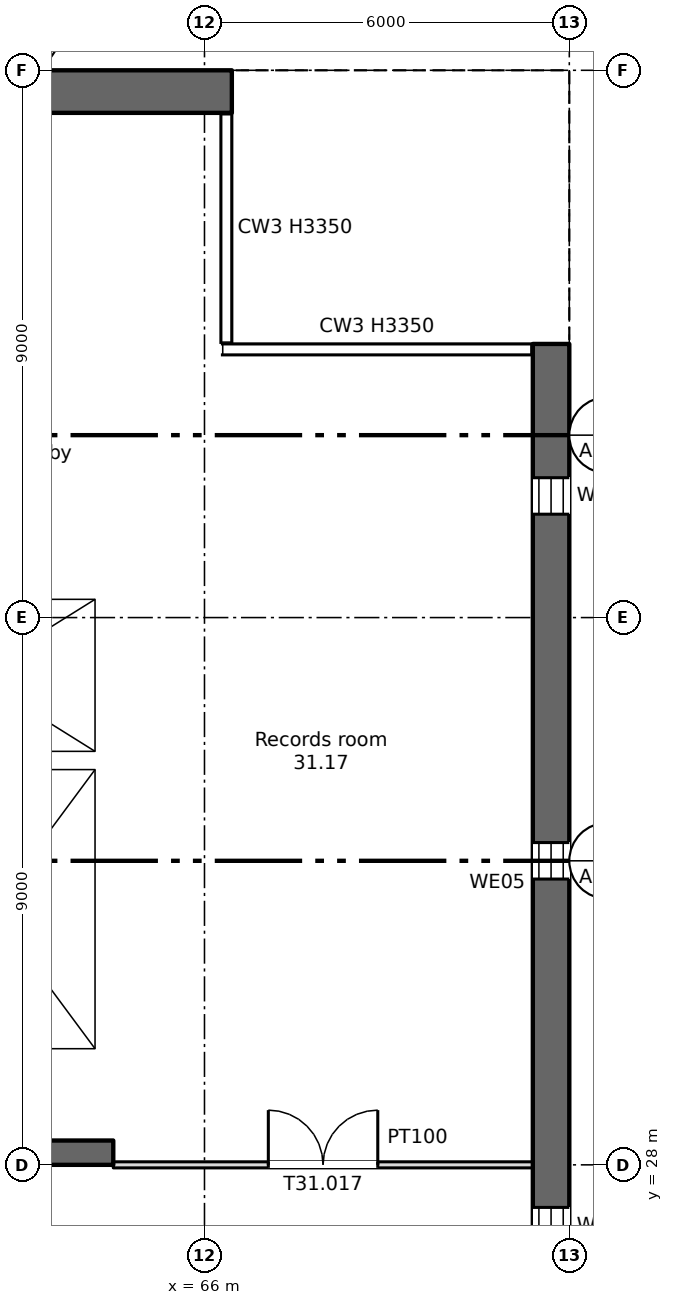
"""IFC4 building model, lengths in metres.
Left out: names, types, materials, properties, quantities, classifications, styles, units other than length and angle.
Written with IfcOpenShell. Run it as: python <this file> out.ifc"""

import sys

from ifc_helpers import new_model, si_unit, direction, frame, frame_2d, origin, place, context, subcontext, project, spatial, rectangle, extrude, element, fill, save


model = new_model("IFC4")
c1 = context("Model", 3, precision=1e-05, world=origin(), true_north=direction((0.0, 1.0)))
c2 = subcontext(c1, "Body", "Model", "MODEL_VIEW")
j1 = project(units=[si_unit("LENGTHUNIT", "METRE"), si_unit("PLANEANGLEUNIT", "RADIAN")], contexts=[c1])
p1 = place(None, origin())
s1 = spatial("IfcSite", under=j1, at=p1, CompositionType="ELEMENT")
p2 = place(p1, origin())
s2 = spatial("IfcBuilding", under=s1, at=p2, CompositionType="ELEMENT")
p3 = place(p2, frame((0.0, 0.0, 215.5)))
s3 = spatial("IfcBuildingStorey", under=s2, at=p3, CompositionType="ELEMENT", Elevation=215.5)
p4 = place(p3, frame((71.7, 7.5, 0.0), z_axis=(0.0, 0.0, 1.0), x_axis=(0.0, 1.0, 0.0)))
e1 = element("IfcWall", 1, at=p4, inside=s3, PredefinedType="SHEAR", context=c2, shape_type="SweptSolid", body=[
    extrude(rectangle(XDim=34.0, YDim=0.6, at=frame_2d((17.0, 0.0))), origin(), (0.0, 0.0, 1.0), 3.35),
])
p5 = place(p4, frame((1.2, 0.0, 0.6)))
e2 = element("IfcOpeningElement", 2, at=p5, cuts=e1, PredefinedType="OPENING", context=c2, shape_type="SweptSolid", body=[
    extrude(rectangle(XDim=0.6, YDim=2.4, at=frame_2d((0.3, 1.2))), frame((0.0, 0.31, 0.0), z_axis=(0.0, -1.0, 0.0), x_axis=(1.0, 0.0, 0.0)), (0.0, 0.0, 1.0), 0.62),
])
p6 = place(p4, frame((7.2, 0.0, 0.6)))
e3 = element("IfcOpeningElement", 3, at=p6, cuts=e1, PredefinedType="OPENING", context=c2, shape_type="SweptSolid", body=[
    extrude(rectangle(XDim=0.6, YDim=2.4, at=frame_2d((0.3, 1.2))), frame((0.0, 0.31, 0.0), z_axis=(0.0, -1.0, 0.0), x_axis=(1.0, 0.0, 0.0)), (0.0, 0.0, 1.0), 0.62),
])
p7 = place(p4, frame((13.2, 0.0, 0.6)))
e4 = element("IfcOpeningElement", 4, at=p7, cuts=e1, PredefinedType="OPENING", context=c2, shape_type="SweptSolid", body=[
    extrude(rectangle(XDim=0.6, YDim=2.4, at=frame_2d((0.3, 1.2))), frame((0.0, 0.31, 0.0), z_axis=(0.0, -1.0, 0.0), x_axis=(1.0, 0.0, 0.0)), (0.0, 0.0, 1.0), 0.62),
])
p8 = place(p4, frame((19.2, 0.0, 0.6)))
e5 = element("IfcOpeningElement", 5, at=p8, cuts=e1, PredefinedType="OPENING", context=c2, shape_type="SweptSolid", body=[
    extrude(rectangle(XDim=0.6, YDim=2.4, at=frame_2d((0.3, 1.2))), frame((0.0, 0.31, 0.0), z_axis=(0.0, -1.0, 0.0), x_axis=(1.0, 0.0, 0.0)), (0.0, 0.0, 1.0), 0.62),
])
p9 = place(p4, frame((25.2, 0.0, 0.6)))
e6 = element("IfcOpeningElement", 6, at=p9, cuts=e1, PredefinedType="OPENING", context=c2, shape_type="SweptSolid", body=[
    extrude(rectangle(XDim=0.6, YDim=2.4, at=frame_2d((0.3, 1.2))), frame((0.0, 0.31, 0.0), z_axis=(0.0, -1.0, 0.0), x_axis=(1.0, 0.0, 0.0)), (0.0, 0.0, 1.0), 0.62),
])
p10 = place(p4, frame((31.2, 0.0, 0.6)))
e7 = element("IfcOpeningElement", 7, at=p10, cuts=e1, PredefinedType="OPENING", context=c2, shape_type="SweptSolid", body=[
    extrude(rectangle(XDim=0.6, YDim=2.4, at=frame_2d((0.3, 1.2))), frame((0.0, 0.31, 0.0), z_axis=(0.0, -1.0, 0.0), x_axis=(1.0, 0.0, 0.0)), (0.0, 0.0, 1.0), 0.62),
])
p11 = place(p3, frame((11.55, 45.65, 0.0), z_axis=(0.0, 0.0, 1.0), x_axis=(1.0, 0.0, 0.0)))
e8 = element("IfcWall", 8, at=p11, inside=s3, PredefinedType="SHEAR", context=c2, shape_type="SweptSolid", body=[
    extrude(rectangle(XDim=54.9, YDim=0.7, at=frame_2d((27.45, 0.0))), origin(), (0.0, 0.0, 1.0), 3.35),
])
p12 = place(p11, frame((1.2, 0.0, 0.6)))
e9 = element("IfcOpeningElement", 9, at=p12, cuts=e8, PredefinedType="OPENING", context=c2, shape_type="SweptSolid", body=[
    extrude(rectangle(XDim=0.6, YDim=2.4, at=frame_2d((0.3, 1.2))), frame((0.0, 0.36, 0.0), z_axis=(0.0, -1.0, 0.0), x_axis=(1.0, 0.0, 0.0)), (0.0, 0.0, 1.0), 0.72),
])
p13 = place(p3, frame((6.6, 28.2, 0.0), z_axis=(0.0, 0.0, 1.0), x_axis=(1.0, 0.0, 0.0)))
e10 = element("IfcWall", 10, at=p13, inside=s3, PredefinedType="SHEAR", context=c2, shape_type="SweptSolid", body=[
    extrude(rectangle(XDim=57.9, YDim=0.4, at=frame_2d((28.95, 0.0))), origin(), (0.0, 0.0, 1.0), 3.35),
])
p14 = place(p13, frame((12.163, 0.0, 0.0)))
e11 = element("IfcOpeningElement", 11, at=p14, cuts=e10, PredefinedType="OPENING", context=c2, shape_type="SweptSolid", body=[
    extrude(rectangle(XDim=0.9, YDim=2.1, at=frame_2d((0.45, 1.05))), frame((0.0, 0.21, 0.0), z_axis=(0.0, -1.0, 0.0), x_axis=(1.0, 0.0, 0.0)), (0.0, 0.0, 1.0), 0.42),
])
p15 = place(p13, frame((14.738, 0.0, 0.0)))
e12 = element("IfcOpeningElement", 12, at=p15, cuts=e10, PredefinedType="OPENING", context=c2, shape_type="SweptSolid", body=[
    extrude(rectangle(XDim=0.9, YDim=2.1, at=frame_2d((0.45, 1.05))), frame((0.0, 0.21, 0.0), z_axis=(0.0, -1.0, 0.0), x_axis=(1.0, 0.0, 0.0)), (0.0, 0.0, 1.0), 0.42),
])
p16 = place(p13, frame((49.163, 0.0, 0.0)))
e13 = element("IfcOpeningElement", 13, at=p16, cuts=e10, PredefinedType="OPENING", context=c2, shape_type="SweptSolid", body=[
    extrude(rectangle(XDim=0.9, YDim=2.1, at=frame_2d((0.45, 1.05))), frame((0.0, 0.21, 0.0), z_axis=(0.0, -1.0, 0.0), x_axis=(1.0, 0.0, 0.0)), (0.0, 0.0, 1.0), 0.42),
])
p17 = place(p13, frame((51.738, 0.0, 0.0)))
e14 = element("IfcOpeningElement", 14, at=p17, cuts=e10, PredefinedType="OPENING", context=c2, shape_type="SweptSolid", body=[
    extrude(rectangle(XDim=0.9, YDim=2.1, at=frame_2d((0.45, 1.05))), frame((0.0, 0.21, 0.0), z_axis=(0.0, -1.0, 0.0), x_axis=(1.0, 0.0, 0.0)), (0.0, 0.0, 1.0), 0.42),
])
p18 = place(p13, frame((1.45, 0.0, 0.0)))
e15 = element("IfcOpeningElement", 15, at=p18, cuts=e10, PredefinedType="OPENING", context=c2, shape_type="SweptSolid", body=[
    extrude(rectangle(XDim=0.9, YDim=2.1, at=frame_2d((0.45, 1.05))), frame((0.0, 0.21, 0.0), z_axis=(0.0, -1.0, 0.0), x_axis=(1.0, 0.0, 0.0)), (0.0, 0.0, 1.0), 0.42),
])
p19 = place(p13, frame((4.8, 0.0, 0.0)))
e16 = element("IfcOpeningElement", 16, at=p19, cuts=e10, PredefinedType="OPENING", context=c2, shape_type="SweptSolid", body=[
    extrude(rectangle(XDim=1.2, YDim=2.1, at=frame_2d((0.6, 1.05))), frame((0.0, 0.21, 0.0), z_axis=(0.0, -1.0, 0.0), x_axis=(1.0, 0.0, 0.0)), (0.0, 0.0, 1.0), 0.42),
])
p20 = place(p13, frame((31.8, 0.0, 0.0)))
e17 = element("IfcOpeningElement", 17, at=p20, cuts=e10, PredefinedType="OPENING", context=c2, shape_type="SweptSolid", body=[
    extrude(rectangle(XDim=1.2, YDim=2.1, at=frame_2d((0.6, 1.05))), frame((0.0, 0.21, 0.0), z_axis=(0.0, -1.0, 0.0), x_axis=(1.0, 0.0, 0.0)), (0.0, 0.0, 1.0), 0.42),
])
p21 = place(p13, frame((55.3, 0.0, 0.0)))
e18 = element("IfcOpeningElement", 18, at=p21, cuts=e10, PredefinedType="OPENING", context=c2, shape_type="SweptSolid", body=[
    extrude(rectangle(XDim=1.2, YDim=2.1, at=frame_2d((0.6, 1.05))), frame((0.0, 0.21, 0.0), z_axis=(0.0, -1.0, 0.0), x_axis=(1.0, 0.0, 0.0)), (0.0, 0.0, 1.0), 0.42),
])
p22 = place(p13, frame((21.8, 0.0, 0.0)))
e19 = element("IfcOpeningElement", 19, at=p22, cuts=e10, PredefinedType="OPENING", context=c2, shape_type="SweptSolid", body=[
    extrude(rectangle(XDim=1.2, YDim=2.1, at=frame_2d((0.6, 1.05))), frame((0.0, 0.21, 0.0), z_axis=(0.0, -1.0, 0.0), x_axis=(1.0, 0.0, 0.0)), (0.0, 0.0, 1.0), 0.42),
])
p23 = place(p13, frame((41.8, 0.0, 0.0)))
e20 = element("IfcOpeningElement", 20, at=p23, cuts=e10, PredefinedType="OPENING", context=c2, shape_type="SweptSolid", body=[
    extrude(rectangle(XDim=1.2, YDim=2.1, at=frame_2d((0.6, 1.05))), frame((0.0, 0.21, 0.0), z_axis=(0.0, -1.0, 0.0), x_axis=(1.0, 0.0, 0.0)), (0.0, 0.0, 1.0), 0.42),
])
p24 = place(p13, frame((24.95, 0.0, 0.0)))
e21 = element("IfcOpeningElement", 21, at=p24, cuts=e10, PredefinedType="OPENING", context=c2, shape_type="SweptSolid", body=[
    extrude(rectangle(XDim=2.4, YDim=2.1, at=frame_2d((1.2, 1.05))), frame((0.0, 0.21, 0.0), z_axis=(0.0, -1.0, 0.0), x_axis=(1.0, 0.0, 0.0)), (0.0, 0.0, 1.0), 0.42),
])
p25 = place(p13, frame((37.45, 0.0, 0.0)))
e22 = element("IfcOpeningElement", 22, at=p25, cuts=e10, PredefinedType="OPENING", context=c2, shape_type="SweptSolid", body=[
    extrude(rectangle(XDim=2.4, YDim=2.1, at=frame_2d((1.2, 1.05))), frame((0.0, 0.21, 0.0), z_axis=(0.0, -1.0, 0.0), x_axis=(1.0, 0.0, 0.0)), (0.0, 0.0, 1.0), 0.42),
])
p26 = place(p13, frame((8.1, 0.0, 0.0)))
e23 = element("IfcOpeningElement", 23, at=p26, cuts=e10, PredefinedType="OPENING", context=c2, shape_type="SweptSolid", body=[
    extrude(rectangle(XDim=2.4, YDim=2.1, at=frame_2d((1.2, 1.05))), frame((0.0, 0.21, 0.0), z_axis=(0.0, -1.0, 0.0), x_axis=(1.0, 0.0, 0.0)), (0.0, 0.0, 1.0), 0.42),
])
p27 = place(p13, frame((28.95, 0.0, 0.0)))
e24 = element("IfcOpeningElement", 24, at=p27, cuts=e10, PredefinedType="OPENING", context=c2, shape_type="SweptSolid", body=[
    extrude(rectangle(XDim=0.9, YDim=2.1, at=frame_2d((0.45, 1.05))), frame((0.0, 0.21, 0.0), z_axis=(0.0, -1.0, 0.0), x_axis=(1.0, 0.0, 0.0)), (0.0, 0.0, 1.0), 0.42),
])
p28 = place(p13, frame((34.95, 0.0, 0.0)))
e25 = element("IfcOpeningElement", 25, at=p28, cuts=e10, PredefinedType="OPENING", context=c2, shape_type="SweptSolid", body=[
    extrude(rectangle(XDim=0.9, YDim=2.1, at=frame_2d((0.45, 1.05))), frame((0.0, 0.21, 0.0), z_axis=(0.0, -1.0, 0.0), x_axis=(1.0, 0.0, 0.0)), (0.0, 0.0, 1.0), 0.42),
])
p29 = place(p3, frame((64.35, 34.8, 0.0), z_axis=(0.0, 0.0, 1.0), x_axis=(0.0, 1.0, 0.0)))
e26 = element("IfcWall", 26, at=p29, inside=s3, PredefinedType="SHEAR", context=c2, shape_type="SweptSolid", body=[
    extrude(rectangle(XDim=10.5, YDim=0.3, at=frame_2d((5.25, 0.0))), origin(), (0.0, 0.0, 1.0), 3.35),
])
p30 = place(p3, frame((64.35, 28.4, 0.0), z_axis=(0.0, 0.0, 1.0), x_axis=(0.0, 1.0, 0.0)))
e27 = element("IfcWall", 27, at=p30, inside=s3, PredefinedType="SHEAR", context=c2, shape_type="SweptSolid", body=[
    extrude(rectangle(XDim=6.1, YDim=0.3, at=frame_2d((3.05, 0.0))), origin(), (0.0, 0.0, 1.0), 3.35),
])
p31 = place(p3, frame((60.2, 34.65, 0.0), z_axis=(0.0, 0.0, 1.0), x_axis=(1.0, 0.0, 0.0)))
e28 = element("IfcWall", 28, at=p31, inside=s3, PredefinedType="SHEAR", context=c2, shape_type="SweptSolid", body=[
    extrude(rectangle(XDim=4.3, YDim=0.3, at=frame_2d((2.15, 0.0))), origin(), (0.0, 0.0, 1.0), 3.35),
])
p32 = place(p3, frame((60.2, 37.45, 0.0), z_axis=(0.0, 0.0, 1.0), x_axis=(1.0, 0.0, 0.0)))
e29 = element("IfcWall", 29, at=p32, inside=s3, PredefinedType="SHEAR", context=c2, shape_type="SweptSolid", body=[
    extrude(rectangle(XDim=4.0, YDim=0.3, at=frame_2d((2.0, 0.0))), origin(), (0.0, 0.0, 1.0), 3.35),
])
p33 = place(p32, frame((1.45, 0.0, 0.0)))
e30 = element("IfcOpeningElement", 30, at=p33, cuts=e29, PredefinedType="OPENING", context=c2, shape_type="SweptSolid", body=[
    extrude(rectangle(XDim=1.1, YDim=2.1, at=frame_2d((0.55, 1.05))), frame((0.0, 0.16, 0.0), z_axis=(0.0, -1.0, 0.0), x_axis=(1.0, 0.0, 0.0)), (0.0, 0.0, 1.0), 0.32),
])
p34 = place(p3, frame((64.5, 28.0, 0.0), z_axis=(0.0, 0.0, 1.0), x_axis=(1.0, 0.0, 0.0)))
e31 = element("IfcWall", 31, at=p34, inside=s3, PredefinedType="PARTITIONING", context=c2, shape_type="SweptSolid", body=[
    extrude(rectangle(XDim=6.9, YDim=0.1, at=frame_2d((3.45, 0.0))), origin(), (0.0, 0.0, 1.0), 3.35),
])
p35 = place(p34, frame((2.55, 0.0, 0.0)))
e32 = element("IfcOpeningElement", 32, at=p35, cuts=e31, PredefinedType="OPENING", context=c2, shape_type="SweptSolid", body=[
    extrude(rectangle(XDim=1.8, YDim=2.1, at=frame_2d((0.9, 1.05))), frame((0.0, 0.06, 0.0), z_axis=(0.0, -1.0, 0.0), x_axis=(1.0, 0.0, 0.0)), (0.0, 0.0, 1.0), 0.12),
])
p36 = place(p8, origin())
e33 = element("IfcWindow", 33, at=p36, inside=s3, PartitioningType="SINGLE_PANEL", PredefinedType="WINDOW", context=c2, shape_type="SweptSolid", body=[
    extrude(rectangle(XDim=0.6, YDim=2.4, at=frame_2d((0.3, 1.2))), frame((0.0, 0.03, 0.0), z_axis=(0.0, -1.0, 0.0), x_axis=(1.0, 0.0, 0.0)), (0.0, 0.0, 1.0), 0.06),
])
fill(e5, e33)
p37 = place(p9, origin())
e34 = element("IfcWindow", 34, at=p37, inside=s3, PartitioningType="SINGLE_PANEL", PredefinedType="WINDOW", context=c2, shape_type="SweptSolid", body=[
    extrude(rectangle(XDim=0.6, YDim=2.4, at=frame_2d((0.3, 1.2))), frame((0.0, 0.03, 0.0), z_axis=(0.0, -1.0, 0.0), x_axis=(1.0, 0.0, 0.0)), (0.0, 0.0, 1.0), 0.06),
])
fill(e6, e34)
p38 = place(p10, origin())
e35 = element("IfcWindow", 35, at=p38, inside=s3, PartitioningType="SINGLE_PANEL", PredefinedType="WINDOW", context=c2, shape_type="SweptSolid", body=[
    extrude(rectangle(XDim=0.6, YDim=2.4, at=frame_2d((0.3, 1.2))), frame((0.0, 0.03, 0.0), z_axis=(0.0, -1.0, 0.0), x_axis=(1.0, 0.0, 0.0)), (0.0, 0.0, 1.0), 0.06),
])
fill(e7, e35)
p39 = place(p35, origin())
e36 = element("IfcDoor", 36, at=p39, inside=s3, OperationType="DOUBLE_DOOR_SINGLE_SWING", PredefinedType="DOOR", context=c2, shape_type="SweptSolid", body=[
    extrude(rectangle(XDim=1.8, YDim=2.1, at=frame_2d((0.9, 1.05))), frame((0.0, 0.025, 0.0), z_axis=(0.0, -1.0, 0.0), x_axis=(1.0, 0.0, 0.0)), (0.0, 0.0, 1.0), 0.05),
])
fill(e32, e36)
save(model, sys.argv[1])
